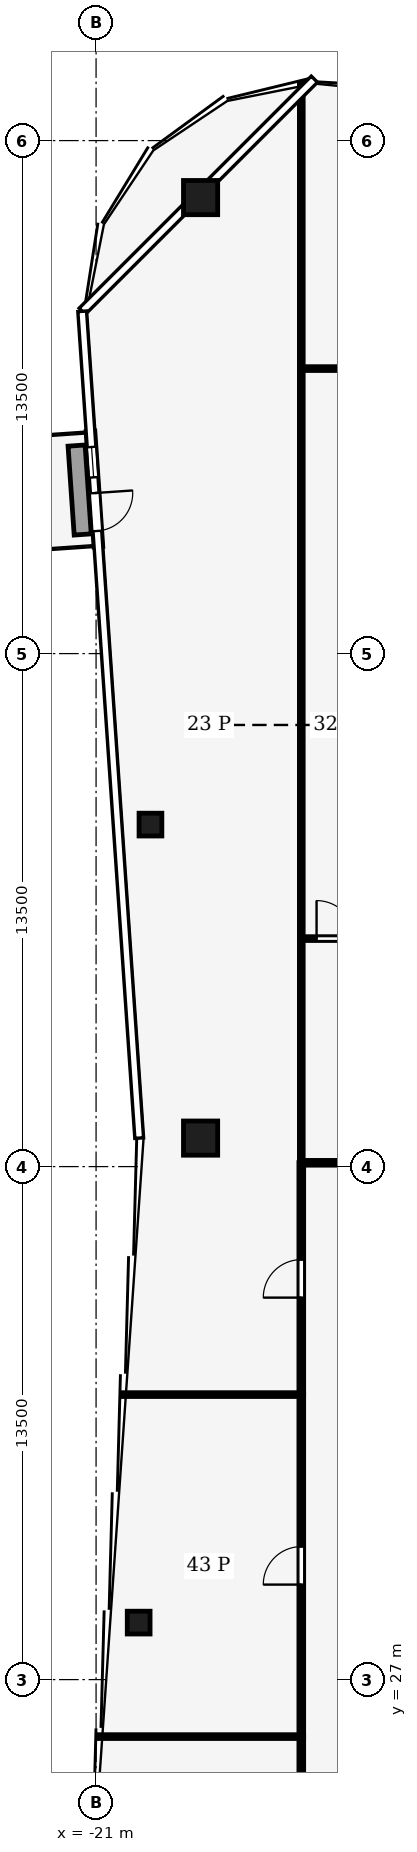
"""IFC4 building model, lengths in metres.
Left out: names, types, materials, properties, quantities, classifications, styles, units other than length and angle.
Written with IfcOpenShell. Run it as: python <this file> out.ifc"""

import sys

from ifc_helpers import new_model, si_unit, direction, frame, frame_2d, origin, origin_2d, place, context, subcontext, project, spatial, rectangle, hollow_rectangle, extrude, element, fill, save


model = new_model("IFC4")
c1 = context("Model", 3, precision=1e-05, world=origin(), true_north=direction((0.0, 1.0)))
c2 = subcontext(c1, "Body", "Model", "MODEL_VIEW")
j1 = project(units=[si_unit("LENGTHUNIT", "METRE"), si_unit("PLANEANGLEUNIT", "RADIAN")], contexts=[c1])
p1 = place(None, origin())
s1 = spatial("IfcSite", under=j1, at=p1, CompositionType="ELEMENT")
p2 = place(p1, origin())
s2 = spatial("IfcBuilding", under=s1, at=p2, CompositionType="ELEMENT")
p3 = place(p2, frame((0.0, 0.0, 314.0)))
s3 = spatial("IfcBuildingStorey", under=s2, at=p3, CompositionType="ELEMENT", Elevation=314.0)
for number, where, z_axis, x_axis in (
    (1, (-18.25, 66.0, 0.0), (0.0, 0.0, 1.0), (1.0, 0.0, 0.0)),
    (2, (-18.25, 41.25, 0.0), (0.0, 0.0, 1.0), (1.0, 0.0, 0.0)),
):
    element("IfcColumn", number, at=place(p3, frame(where, z_axis=z_axis, x_axis=x_axis)), inside=s3, PredefinedType="COLUMN", context=c2, shape_type="SweptSolid", body=[
        extrude(hollow_rectangle(XDim=0.9, YDim=0.9, WallThickness=0.04, at=origin_2d()), origin(), (0.0, 0.0, 1.0), 4.0),
    ])
for number, where, z_axis, x_axis in (
    (3, (-19.879, 28.5, 0.0), (0.0, 0.0, 1.0), (1.0, 0.0, 0.0)),
    (4, (-19.569, 49.5, 0.0), (0.0, 0.0, 1.0), (1.0, 0.0, 0.0)),
):
    element("IfcColumn", number, at=place(p3, frame(where, z_axis=z_axis, x_axis=x_axis)), inside=s3, PredefinedType="COLUMN", context=c2, shape_type="SweptSolid", body=[
        extrude(hollow_rectangle(XDim=0.6, YDim=0.6, WallThickness=0.025, at=origin_2d()), origin(), (0.0, 0.0, 1.0), 4.0),
    ])
p4 = place(p3, frame((-21.148, 59.85, 0.0), z_axis=(0.0, 0.0, 1.0), x_axis=(0.068802091615, -0.997630328423, 0.0)))
e5 = element("IfcWall", 5, at=p4, inside=s3, PredefinedType="SOLIDWALL", context=c2, shape_type="SweptSolid", body=[
    extrude(rectangle(XDim=3.045, YDim=0.23, at=frame_2d((1.522, 0.0))), origin(), (0.0, 0.0, 1.0), 3.65),
])
p5 = place(p4, frame((1.63, 0.0, 0.0)))
e6 = element("IfcOpeningElement", 6, at=p5, cuts=e5, PredefinedType="OPENING", context=c2, shape_type="SweptSolid", body=[
    extrude(rectangle(XDim=1.0, YDim=2.1, at=frame_2d((0.5, 1.05))), frame((0.0, 0.125, 0.0), z_axis=(0.0, -1.0, 0.0), x_axis=(1.0, 0.0, 0.0)), (0.0, 0.0, 1.0), 0.25),
])
p6 = place(p4, frame((0.415, 0.0, 0.9)))
e7 = element("IfcOpeningElement", 7, at=p6, cuts=e5, PredefinedType="OPENING", context=c2, shape_type="SweptSolid", body=[
    extrude(rectangle(XDim=0.8, YDim=1.2, at=frame_2d((0.4, 0.6))), frame((0.0, 0.125, 0.0), z_axis=(0.0, -1.0, 0.0), x_axis=(1.0, 0.0, 0.0)), (0.0, 0.0, 1.0), 0.25),
])
p7 = place(p3, frame((-21.513, 59.474, 0.0), z_axis=(0.0, 0.0, 1.0), x_axis=(0.068723472833, -0.997635747295, 0.0)))
e8 = element("IfcWall", 8, at=p7, inside=s3, PredefinedType="USERDEFINED", context=c2, shape_type="SweptSolid", body=[
    extrude(rectangle(XDim=2.345, YDim=0.45, at=frame_2d((1.172, 0.0))), origin(), (0.0, 0.0, 1.0), 0.4),
])
p8 = place(p3, frame((-15.6, 13.49, 0.0), z_axis=(0.0, 0.0, 1.0), x_axis=(0.0, 1.0, 0.0)))
e9 = element("IfcWall", 9, at=p8, inside=s3, PredefinedType="PARTITIONING", context=c2, shape_type="SweptSolid", body=[
    extrude(rectangle(XDim=12.01, YDim=0.125, at=frame_2d((6.005, 0.0))), origin(), (0.0, 0.0, 1.0), 2.93),
])
p9 = place(p8, frame((5.571, 0.0, 0.0)))
e10 = element("IfcOpeningElement", 10, at=p9, cuts=e9, PredefinedType="OPENING", context=c2, shape_type="SweptSolid", body=[
    extrude(rectangle(XDim=1.0, YDim=2.1, at=frame_2d((0.5, 1.05))), frame((0.0, 0.073, 0.0), z_axis=(0.0, -1.0, 0.0), x_axis=(1.0, 0.0, 0.0)), (0.0, 0.0, 1.0), 0.145),
])
p10 = place(p3, frame((-15.6, 25.5, 0.0), z_axis=(0.0, 0.0, 1.0), x_axis=(0.0, 1.0, 0.0)))
e11 = element("IfcWall", 11, at=p10, inside=s3, PredefinedType="PARTITIONING", context=c2, shape_type="SweptSolid", body=[
    extrude(rectangle(XDim=9.0, YDim=0.125, at=frame_2d((4.5, 0.0))), origin(), (0.0, 0.0, 1.0), 3.54),
])
p11 = place(p10, frame((4.0, 0.0, 0.0)))
e12 = element("IfcOpeningElement", 12, at=p11, cuts=e11, PredefinedType="OPENING", context=c2, shape_type="SweptSolid", body=[
    extrude(rectangle(XDim=1.0, YDim=2.1, at=frame_2d((0.5, 1.05))), frame((0.0, 0.073, 0.0), z_axis=(0.0, -1.0, 0.0), x_axis=(1.0, 0.0, 0.0)), (0.0, 0.0, 1.0), 0.145),
])
p12 = place(p3, frame((-15.6, 34.5, 0.0), z_axis=(0.0, 0.0, 1.0), x_axis=(0.0, 1.0, 0.0)))
e13 = element("IfcWall", 13, at=p12, inside=s3, PredefinedType="PARTITIONING", context=c2, shape_type="SweptSolid", body=[
    extrude(rectangle(XDim=6.104, YDim=0.125, at=frame_2d((3.052, 0.0))), origin(), (0.0, 0.0, 1.0), 3.14),
])
p13 = place(p12, frame((2.552, 0.0, 0.0)))
e14 = element("IfcOpeningElement", 14, at=p13, cuts=e13, PredefinedType="OPENING", context=c2, shape_type="SweptSolid", body=[
    extrude(rectangle(XDim=1.0, YDim=2.1, at=frame_2d((0.5, 1.05))), frame((0.0, 0.073, 0.0), z_axis=(0.0, -1.0, 0.0), x_axis=(1.0, 0.0, 0.0)), (0.0, 0.0, 1.0), 0.145),
])
p14 = place(p3, frame((-15.6, 40.6, 0.0), z_axis=(0.0, 0.0, 1.0), x_axis=(1.0, 0.0, 0.0)))
e15 = element("IfcWall", 15, at=p14, inside=s3, PredefinedType="PARTITIONING", context=c2, shape_type="SweptSolid", body=[
    extrude(rectangle(XDim=6.6, YDim=0.125, at=frame_2d((3.3, 0.0))), origin(), (0.0, 0.0, 1.0), 3.39),
])
p15 = place(p14, frame((2.8, 0.0, 0.0)))
e16 = element("IfcOpeningElement", 16, at=p15, cuts=e15, PredefinedType="OPENING", context=c2, shape_type="SweptSolid", body=[
    extrude(rectangle(XDim=1.0, YDim=2.1, at=frame_2d((0.5, 1.05))), frame((0.0, 0.073, 0.0), z_axis=(0.0, -1.0, 0.0), x_axis=(1.0, 0.0, 0.0)), (0.0, 0.0, 1.0), 0.145),
])
p16 = place(p3, frame((-15.6, 25.5, 0.0), z_axis=(0.0, 0.0, 1.0), x_axis=(-1.0, 0.0, 0.0)))
e17 = element("IfcWall", 17, at=p16, inside=s3, PredefinedType="PARTITIONING", context=c2, shape_type="SweptSolid", body=[
    extrude(rectangle(XDim=5.316, YDim=0.1, at=frame_2d((2.658, 0.0))), origin(), (0.0, 0.0, 1.0), 3.04),
])
p17 = place(p3, frame((-15.6, 34.5, 0.0), z_axis=(0.0, 0.0, 1.0), x_axis=(-1.0, 0.0, 0.0)))
e18 = element("IfcWall", 18, at=p17, inside=s3, PredefinedType="PARTITIONING", context=c2, shape_type="SweptSolid", body=[
    extrude(rectangle(XDim=4.695, YDim=0.1, at=frame_2d((2.348, 0.0))), origin(), (0.0, 0.0, 1.0), 3.04),
])
p18 = place(p3, frame((-15.6, 40.6, 0.0), z_axis=(0.0, 0.0, 1.0), x_axis=(0.0, 1.0, 0.0)))
e19 = element("IfcWall", 19, at=p18, inside=s3, PredefinedType="PARTITIONING", context=c2, shape_type="SweptSolid", body=[
    extrude(rectangle(XDim=5.9, YDim=0.1, at=frame_2d((2.95, 0.0))), origin(), (0.0, 0.0, 1.0), 3.87),
])
p19 = place(p3, frame((-15.6, 46.5, 0.0), z_axis=(0.0, 0.0, 1.0), x_axis=(0.0, 1.0, 0.0)))
e20 = element("IfcWall", 20, at=p19, inside=s3, PredefinedType="PARTITIONING", context=c2, shape_type="SweptSolid", body=[
    extrude(rectangle(XDim=15.0, YDim=0.1, at=frame_2d((7.5, 0.0))), origin(), (0.0, 0.0, 1.0), 3.35),
])
p20 = place(p3, frame((-15.6, 61.5, 0.0), z_axis=(0.0, 0.0, 1.0), x_axis=(0.0, 1.0, 0.0)))
e21 = element("IfcWall", 21, at=p20, inside=s3, PredefinedType="PARTITIONING", context=c2, shape_type="SweptSolid", body=[
    extrude(rectangle(XDim=7.51, YDim=0.1, at=frame_2d((3.755, 0.0))), origin(), (0.0, 0.0, 1.0), 2.93),
])
p21 = place(p3, frame((-15.6, 46.5, 0.0), z_axis=(0.0, 0.0, 1.0), x_axis=(1.0, 0.0, 0.0)))
e22 = element("IfcWall", 22, at=p21, inside=s3, PredefinedType="PARTITIONING", context=c2, shape_type="SweptSolid", body=[
    extrude(rectangle(XDim=6.604, YDim=0.1, at=frame_2d((3.302, 0.0))), origin(), (0.0, 0.0, 1.0), 3.39),
])
p22 = place(p21, frame((0.402, 0.0, 0.0)))
e23 = element("IfcOpeningElement", 23, at=p22, cuts=e22, PredefinedType="OPENING", context=c2, shape_type="SweptSolid", body=[
    extrude(rectangle(XDim=1.0, YDim=2.1, at=frame_2d((0.5, 1.05))), frame((0.0, 0.06, 0.0), z_axis=(0.0, -1.0, 0.0), x_axis=(1.0, 0.0, 0.0)), (0.0, 0.0, 1.0), 0.12),
])
p23 = place(p3, frame((-15.6, 61.5, 0.0), z_axis=(0.0, 0.0, 1.0), x_axis=(1.0, 0.0, 0.0)))
e24 = element("IfcWall", 24, at=p23, inside=s3, PredefinedType="PARTITIONING", context=c2, shape_type="SweptSolid", body=[
    extrude(rectangle(XDim=9.6, YDim=0.1, at=frame_2d((4.8, 0.0))), origin(), (0.0, 0.0, 1.0), 3.24),
])
p24 = place(p23, frame((4.3, 0.0, 0.0)))
e25 = element("IfcOpeningElement", 25, at=p24, cuts=e24, PredefinedType="OPENING", context=c2, shape_type="SweptSolid", body=[
    extrude(rectangle(XDim=1.0, YDim=2.1, at=frame_2d((0.5, 1.05))), frame((0.0, 0.06, 0.0), z_axis=(0.0, -1.0, 0.0), x_axis=(1.0, 0.0, 0.0)), (0.0, 0.0, 1.0), 0.12),
])
p25 = place(p5, origin())
e26 = element("IfcDoor", 26, at=p25, inside=s3, OperationType="SINGLE_SWING_RIGHT", PredefinedType="DOOR", context=c2, shape_type="SweptSolid", body=[
    extrude(rectangle(XDim=1.0, YDim=2.1, at=frame_2d((0.5, 1.05))), frame((0.0, 0.025, 0.0), z_axis=(0.0, -1.0, 0.0), x_axis=(1.0, 0.0, 0.0)), (0.0, 0.0, 1.0), 0.05),
])
fill(e6, e26)
p26 = place(p6, origin())
e27 = element("IfcWindow", 27, at=p26, inside=s3, PartitioningType="SINGLE_PANEL", PredefinedType="WINDOW", context=c2, shape_type="SweptSolid", body=[
    extrude(rectangle(XDim=0.8, YDim=1.2, at=frame_2d((0.4, 0.6))), frame((0.0, 0.03, 0.0), z_axis=(0.0, -1.0, 0.0), x_axis=(1.0, 0.0, 0.0)), (0.0, 0.0, 1.0), 0.06),
])
fill(e7, e27)
p27 = place(p11, origin())
e28 = element("IfcDoor", 28, at=p27, inside=s3, OperationType="SINGLE_SWING_RIGHT", PredefinedType="DOOR", context=c2, shape_type="SweptSolid", body=[
    extrude(rectangle(XDim=1.0, YDim=2.1, at=frame_2d((0.5, 1.05))), frame((0.0, 0.025, 0.0), z_axis=(0.0, -1.0, 0.0), x_axis=(1.0, 0.0, 0.0)), (0.0, 0.0, 1.0), 0.05),
])
fill(e12, e28)
p28 = place(p13, origin())
e29 = element("IfcDoor", 29, at=p28, inside=s3, OperationType="SINGLE_SWING_LEFT", PredefinedType="DOOR", context=c2, shape_type="SweptSolid", body=[
    extrude(rectangle(XDim=1.0, YDim=2.1, at=frame_2d((0.5, 1.05))), frame((0.0, 0.025, 0.0), z_axis=(0.0, -1.0, 0.0), x_axis=(1.0, 0.0, 0.0)), (0.0, 0.0, 1.0), 0.05),
])
fill(e14, e29)
p29 = place(p22, origin())
e30 = element("IfcDoor", 30, at=p29, inside=s3, OperationType="SINGLE_SWING_LEFT", PredefinedType="DOOR", context=c2, shape_type="SweptSolid", body=[
    extrude(rectangle(XDim=1.0, YDim=2.1, at=frame_2d((0.5, 1.05))), frame((0.0, 0.025, 0.0), z_axis=(0.0, -1.0, 0.0), x_axis=(1.0, 0.0, 0.0)), (0.0, 0.0, 1.0), 0.05),
])
fill(e23, e30)
save(model, sys.argv[1])
